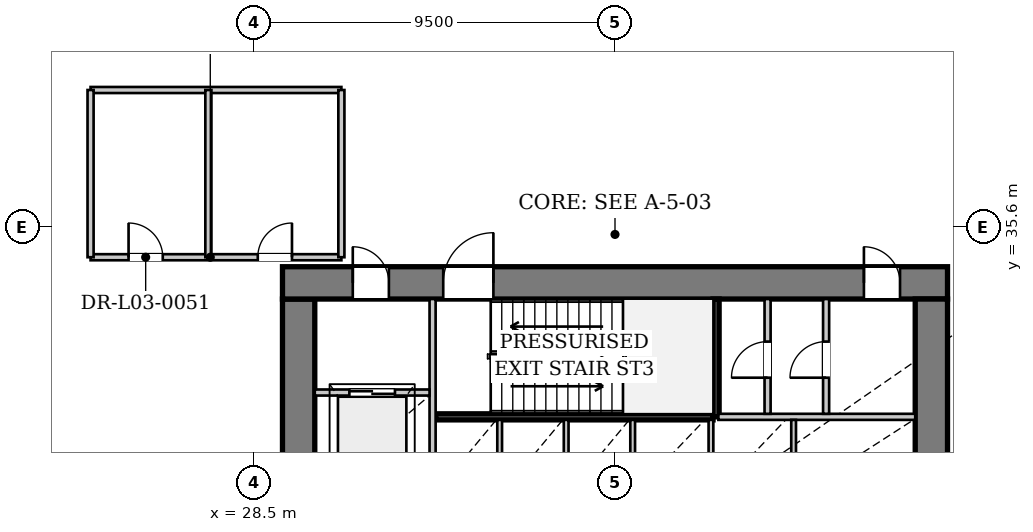
"""IFC4 building model, lengths in metres.
Left out: names, types, materials, properties, quantities, classifications, styles, units other than length and angle.
Written with IfcOpenShell. Run it as: python <this file> out.ifc"""

import sys

from ifc_helpers import new_model, si_unit, direction, frame, frame_2d, origin, place, context, subcontext, project, spatial, rectangle, extrude, source, transform, mapped, element, fill, save


model = new_model("IFC4")
c1 = context("Model", 3, precision=1e-05, world=origin(), true_north=direction((0.0, 1.0)))
c2 = subcontext(c1, "Body", "Model", "MODEL_VIEW")
j1 = project(units=[si_unit("LENGTHUNIT", "METRE"), si_unit("PLANEANGLEUNIT", "RADIAN")], contexts=[c1])
p1 = place(None, origin())
s1 = spatial("IfcSite", under=j1, at=p1, CompositionType="ELEMENT")
p2 = place(p1, origin())
s2 = spatial("IfcBuilding", under=s1, at=p2, CompositionType="ELEMENT")
p3 = place(p2, frame((0.0, 0.0, 15.6)))
s3 = spatial("IfcBuildingStorey", under=s2, at=p3, CompositionType="ELEMENT", Elevation=15.6)
p4 = place(p3, frame((29.675, 19.5, 0.0), z_axis=(0.0, 0.0, 1.0), x_axis=(0.0, 1.0, 0.0)))
e1 = element("IfcWall", 1, at=p4, inside=s3, PredefinedType="SHEAR", context=c2, shape_type="SweptSolid", body=[
    extrude(rectangle(XDim=14.2, YDim=0.85, at=frame_2d((7.1, 0.0))), origin(), (0.0, 0.0, 1.0), 4.18),
])
p5 = place(p4, frame((7.42, 0.0, 0.0)))
e2 = element("IfcOpeningElement", 2, at=p5, cuts=e1, PredefinedType="OPENING", context=c2, shape_type="SweptSolid", body=[
    extrude(rectangle(XDim=1.6, YDim=2.2, at=frame_2d((0.8, 1.1))), frame((0.0, 0.435, 0.0), z_axis=(0.0, -1.0, 0.0), x_axis=(1.0, 0.0, 0.0)), (0.0, 0.0, 1.0), 0.87),
])
p6 = place(p3, frame((29.25, 34.125, 0.0), z_axis=(0.0, 0.0, 1.0), x_axis=(1.0, 0.0, 0.0)))
e3 = element("IfcWall", 3, at=p6, inside=s3, PredefinedType="SHEAR", context=c2, shape_type="SweptSolid", body=[
    extrude(rectangle(XDim=17.5, YDim=0.85, at=frame_2d((8.75, 0.0))), origin(), (0.0, 0.0, 1.0), 4.18),
])
p7 = place(p6, frame((1.85, 0.0, 0.0)))
e4 = element("IfcOpeningElement", 4, at=p7, cuts=e3, PredefinedType="OPENING", context=c2, shape_type="SweptSolid", body=[
    extrude(rectangle(XDim=0.95, YDim=2.1, at=frame_2d((0.475, 1.05))), frame((0.0, 0.435, 0.0), z_axis=(0.0, -1.0, 0.0), x_axis=(1.0, 0.0, 0.0)), (0.0, 0.0, 1.0), 0.87),
])
p8 = place(p6, frame((4.23, 0.0, 0.0)))
e5 = element("IfcOpeningElement", 5, at=p8, cuts=e3, PredefinedType="OPENING", context=c2, shape_type="SweptSolid", body=[
    extrude(rectangle(XDim=1.32, YDim=2.2, at=frame_2d((0.66, 1.1))), frame((0.0, 0.435, 0.0), z_axis=(0.0, -1.0, 0.0), x_axis=(1.0, 0.0, 0.0)), (0.0, 0.0, 1.0), 0.87),
])
p9 = place(p6, frame((15.3, 0.0, 0.0)))
e6 = element("IfcOpeningElement", 6, at=p9, cuts=e3, PredefinedType="OPENING", context=c2, shape_type="SweptSolid", body=[
    extrude(rectangle(XDim=0.95, YDim=2.1, at=frame_2d((0.475, 1.05))), frame((0.0, 0.435, 0.0), z_axis=(0.0, -1.0, 0.0), x_axis=(1.0, 0.0, 0.0)), (0.0, 0.0, 1.0), 0.87),
])
p10 = place(p3, frame((46.325, 33.7, 0.0), z_axis=(0.0, 0.0, 1.0), x_axis=(0.0, -1.0, 0.0)))
e7 = element("IfcWall", 7, at=p10, inside=s3, PredefinedType="SHEAR", context=c2, shape_type="SweptSolid", body=[
    extrude(rectangle(XDim=14.2, YDim=0.85, at=frame_2d((7.1, 0.0))), origin(), (0.0, 0.0, 1.0), 4.18),
])
p11 = place(p10, frame((5.18, 0.0, 0.0)))
e8 = element("IfcOpeningElement", 8, at=p11, cuts=e7, PredefinedType="OPENING", context=c2, shape_type="SweptSolid", body=[
    extrude(rectangle(XDim=1.6, YDim=2.2, at=frame_2d((0.8, 1.1))), frame((0.0, 0.435, 0.0), z_axis=(0.0, -1.0, 0.0), x_axis=(1.0, 0.0, 0.0)), (0.0, 0.0, 1.0), 0.87),
])
p12 = place(p3, frame((33.28, 30.6, 0.0), z_axis=(0.0, 0.0, 1.0), x_axis=(1.0, 0.0, 0.0)))
e9 = element("IfcWall", 9, at=p12, inside=s3, PredefinedType="PARTITIONING", context=c2, shape_type="SweptSolid", body=[
    extrude(rectangle(XDim=7.3, YDim=0.16, at=frame_2d((3.65, 0.0))), origin(), (0.0, 0.0, 1.0), 4.18),
])
p13 = place(p3, frame((40.66, 30.6, 0.0), z_axis=(0.0, 0.0, 1.0), x_axis=(0.0, 1.0, 0.0)))
e10 = element("IfcWall", 10, at=p13, inside=s3, PredefinedType="PARTITIONING", context=c2, shape_type="SweptSolid", body=[
    extrude(rectangle(XDim=3.1, YDim=0.16, at=frame_2d((1.55, 0.0))), origin(), (0.0, 0.0, 1.0), 4.18),
])
p14 = place(p3, frame((33.2, 28.44, 0.0), z_axis=(0.0, 0.0, 1.0), x_axis=(0.0, 1.0, 0.0)))
e11 = element("IfcWall", 11, at=p14, inside=s3, PredefinedType="PARTITIONING", context=c2, shape_type="SweptSolid", body=[
    extrude(rectangle(XDim=5.26, YDim=0.16, at=frame_2d((2.63, 0.0))), origin(), (0.0, 0.0, 1.0), 4.18),
])
p15 = place(p3, frame((30.1, 31.24, 0.0), z_axis=(0.0, 0.0, 1.0), x_axis=(1.0, 0.0, 0.0)))
e12 = element("IfcWall", 12, at=p15, inside=s3, PredefinedType="PARTITIONING", context=c2, shape_type="SweptSolid", body=[
    extrude(rectangle(XDim=3.02, YDim=0.16, at=frame_2d((1.51, 0.0))), origin(), (0.0, 0.0, 1.0), 4.18),
])
p16 = place(p15, frame((0.91, 0.0, 0.0)))
e13 = element("IfcOpeningElement", 13, at=p16, cuts=e12, PredefinedType="OPENING", context=c2, shape_type="SweptSolid", body=[
    extrude(rectangle(XDim=1.2, YDim=2.2, at=frame_2d((0.6, 1.1))), frame((0.0, 0.09, 0.0), z_axis=(0.0, -1.0, 0.0), x_axis=(1.0, 0.0, 0.0)), (0.0, 0.0, 1.0), 0.18),
])
p17 = place(p3, frame((40.72, 30.6, 0.0), z_axis=(0.0, 0.0, 1.0), x_axis=(1.0, 0.0, 0.0)))
e14 = element("IfcWall", 14, at=p17, inside=s3, PredefinedType="PARTITIONING", context=c2, shape_type="SweptSolid", body=[
    extrude(rectangle(XDim=5.18, YDim=0.16, at=frame_2d((2.59, 0.0))), origin(), (0.0, 0.0, 1.0), 4.18),
])
for number, where, z_axis, x_axis in (
    (15, (34.965, 28.6, 0.0), (0.0, 0.0, 1.0), (0.0, 1.0, 0.0)),
    (16, (36.715, 28.6, 0.0), (0.0, 0.0, 1.0), (0.0, 1.0, 0.0)),
    (17, (38.465, 28.6, 0.0), (0.0, 0.0, 1.0), (0.0, 1.0, 0.0)),
    (18, (40.525, 28.6, 0.0), (0.0, 0.0, 1.0), (0.0, 1.0, 0.0)),
    (19, (42.7, 28.6, 0.0), (0.0, 0.0, 1.0), (0.0, 1.0, 0.0)),
):
    element("IfcWall", number, at=place(p3, frame(where, z_axis=z_axis, x_axis=x_axis)), inside=s3, PredefinedType="PARTITIONING", context=c2, shape_type="SweptSolid", body=[
        extrude(rectangle(XDim=1.92, YDim=0.125, at=frame_2d((0.96, 0.0))), origin(), (0.0, 0.0, 1.0), 4.18),
    ])
p18 = place(p3, frame((42.015, 30.68, 0.0), z_axis=(0.0, 0.0, 1.0), x_axis=(0.0, 1.0, 0.0)))
e20 = element("IfcWall", 20, at=p18, inside=s3, PredefinedType="PARTITIONING", context=c2, shape_type="SweptSolid", body=[
    extrude(rectangle(XDim=3.02, YDim=0.16, at=frame_2d((1.51, 0.0))), origin(), (0.0, 0.0, 1.0), 4.18),
])
p19 = place(p18, frame((0.95, 0.0, 0.0)))
e21 = element("IfcOpeningElement", 21, at=p19, cuts=e20, PredefinedType="OPENING", context=c2, shape_type="SweptSolid", body=[
    extrude(rectangle(XDim=0.95, YDim=2.1, at=frame_2d((0.475, 1.05))), frame((0.0, 0.09, 0.0), z_axis=(0.0, -1.0, 0.0), x_axis=(1.0, 0.0, 0.0)), (0.0, 0.0, 1.0), 0.18),
])
p20 = place(p3, frame((43.555, 30.68, 0.0), z_axis=(0.0, 0.0, 1.0), x_axis=(0.0, 1.0, 0.0)))
e22 = element("IfcWall", 22, at=p20, inside=s3, PredefinedType="PARTITIONING", context=c2, shape_type="SweptSolid", body=[
    extrude(rectangle(XDim=3.02, YDim=0.16, at=frame_2d((1.51, 0.0))), origin(), (0.0, 0.0, 1.0), 4.18),
])
p21 = place(p20, frame((0.95, 0.0, 0.0)))
e23 = element("IfcOpeningElement", 23, at=p21, cuts=e22, PredefinedType="OPENING", context=c2, shape_type="SweptSolid", body=[
    extrude(rectangle(XDim=0.95, YDim=2.1, at=frame_2d((0.475, 1.05))), frame((0.0, 0.09, 0.0), z_axis=(0.0, -1.0, 0.0), x_axis=(1.0, 0.0, 0.0)), (0.0, 0.0, 1.0), 0.18),
])
p22 = place(p3, frame((24.2, 34.8, 0.0), z_axis=(0.0, 0.0, 1.0), x_axis=(1.0, 0.0, 0.0)))
e24 = element("IfcWall", 24, at=p22, inside=s3, PredefinedType="PARTITIONING", context=c2, shape_type="SweptSolid", body=[
    extrude(rectangle(XDim=6.6, YDim=0.16, at=frame_2d((3.3, 0.0))), origin(), (0.0, 0.0, 1.0), 3.53),
])
p23 = place(p22, frame((1.0, 0.0, 0.0)))
e25 = element("IfcOpeningElement", 25, at=p23, cuts=e24, PredefinedType="OPENING", context=c2, shape_type="SweptSolid", body=[
    extrude(rectangle(XDim=0.9, YDim=2.1, at=frame_2d((0.45, 1.05))), frame((0.0, 0.09, 0.0), z_axis=(0.0, -1.0, 0.0), x_axis=(1.0, 0.0, 0.0)), (0.0, 0.0, 1.0), 0.18),
])
p24 = place(p22, frame((4.4, 0.0, 0.0)))
e26 = element("IfcOpeningElement", 26, at=p24, cuts=e24, PredefinedType="OPENING", context=c2, shape_type="SweptSolid", body=[
    extrude(rectangle(XDim=0.9, YDim=2.1, at=frame_2d((0.45, 1.05))), frame((0.0, 0.09, 0.0), z_axis=(0.0, -1.0, 0.0), x_axis=(1.0, 0.0, 0.0)), (0.0, 0.0, 1.0), 0.18),
])
p25 = place(p3, frame((24.2, 39.2, 0.0), z_axis=(0.0, 0.0, 1.0), x_axis=(1.0, 0.0, 0.0)))
e27 = element("IfcWall", 27, at=p25, inside=s3, PredefinedType="PARTITIONING", context=c2, shape_type="SweptSolid", body=[
    extrude(rectangle(XDim=6.6, YDim=0.16, at=frame_2d((3.3, 0.0))), origin(), (0.0, 0.0, 1.0), 3.53),
])
for number, where, z_axis, x_axis in (
    (28, (24.2, 34.8, 0.0), (0.0, 0.0, 1.0), (0.0, 1.0, 0.0)),
    (29, (27.3, 34.8, 0.0), (0.0, 0.0, 1.0), (0.0, 1.0, 0.0)),
    (30, (30.8, 34.8, 0.0), (0.0, 0.0, 1.0), (0.0, 1.0, 0.0)),
):
    element("IfcWall", number, at=place(p3, frame(where, z_axis=z_axis, x_axis=x_axis)), inside=s3, PredefinedType="PARTITIONING", context=c2, shape_type="SweptSolid", body=[
        extrude(rectangle(XDim=4.4, YDim=0.16, at=frame_2d((2.2, 0.0))), origin(), (0.0, 0.0, 1.0), 3.53),
    ])
m1 = source(origin(), c2, "Body", "SweptSolid", [
    extrude(rectangle(XDim=0.95, YDim=2.1, at=frame_2d((0.475, 1.05))), frame((0.0, 0.025, 0.0), z_axis=(0.0, -1.0, 0.0), x_axis=(1.0, 0.0, 0.0)), (0.0, 0.0, 1.0), 0.05),
])
p26 = place(p7, origin())
e31 = element("IfcDoor", 31, at=p26, inside=s3, OperationType="SINGLE_SWING_LEFT", PredefinedType="DOOR", context=c2, shape_type="MappedRepresentation", body=[
    mapped(m1, transform((0.0, 0.0, 0.0), x_axis=(1.0, 0.0, 0.0), y_axis=(0.0, 1.0, 0.0), z_axis=(0.0, 0.0, 1.0), scale=1.0)),
])
fill(e4, e31)
m2 = source(origin(), c2, "Body", "SweptSolid", [
    extrude(rectangle(XDim=1.32, YDim=2.2, at=frame_2d((0.66, 1.1))), frame((0.0, 0.025, 0.0), z_axis=(0.0, -1.0, 0.0), x_axis=(1.0, 0.0, 0.0)), (0.0, 0.0, 1.0), 0.05),
])
p27 = place(p8, origin())
e32 = element("IfcDoor", 32, at=p27, inside=s3, OperationType="SINGLE_SWING_RIGHT", PredefinedType="DOOR", context=c2, shape_type="MappedRepresentation", body=[
    mapped(m2, transform((0.0, 0.0, 0.0), x_axis=(1.0, 0.0, 0.0), y_axis=(0.0, 1.0, 0.0), z_axis=(0.0, 0.0, 1.0), scale=1.0)),
])
fill(e5, e32)
m3 = source(origin(), c2, "Body", "SweptSolid", [
    extrude(rectangle(XDim=1.2, YDim=2.2, at=frame_2d((0.6, 1.1))), frame((0.0, 0.025, 0.0), z_axis=(0.0, -1.0, 0.0), x_axis=(1.0, 0.0, 0.0)), (0.0, 0.0, 1.0), 0.05),
])
p28 = place(p16, origin())
e33 = element("IfcDoor", 33, at=p28, inside=s3, OperationType="DOUBLE_DOOR_SLIDING", PredefinedType="DOOR", context=c2, shape_type="MappedRepresentation", body=[
    mapped(m3, transform((0.0, 0.0, 0.0), x_axis=(1.0, 0.0, 0.0), y_axis=(0.0, 1.0, 0.0), z_axis=(0.0, 0.0, 1.0), scale=1.0)),
])
fill(e13, e33)
p29 = place(p19, origin())
e34 = element("IfcDoor", 34, at=p29, inside=s3, OperationType="SINGLE_SWING_LEFT", PredefinedType="DOOR", context=c2, shape_type="MappedRepresentation", body=[
    mapped(m1, transform((0.0, 0.0, 0.0), x_axis=(1.0, 0.0, 0.0), y_axis=(0.0, 1.0, 0.0), z_axis=(0.0, 0.0, 1.0), scale=1.0)),
])
fill(e21, e34)
p30 = place(p21, origin())
e35 = element("IfcDoor", 35, at=p30, inside=s3, OperationType="SINGLE_SWING_LEFT", PredefinedType="DOOR", context=c2, shape_type="MappedRepresentation", body=[
    mapped(m1, transform((0.0, 0.0, 0.0), x_axis=(1.0, 0.0, 0.0), y_axis=(0.0, 1.0, 0.0), z_axis=(0.0, 0.0, 1.0), scale=1.0)),
])
fill(e23, e35)
p31 = place(p9, origin())
e36 = element("IfcDoor", 36, at=p31, inside=s3, OperationType="SINGLE_SWING_LEFT", PredefinedType="DOOR", context=c2, shape_type="MappedRepresentation", body=[
    mapped(m1, transform((0.0, 0.0, 0.0), x_axis=(1.0, 0.0, 0.0), y_axis=(0.0, 1.0, 0.0), z_axis=(0.0, 0.0, 1.0), scale=1.0)),
])
fill(e6, e36)
m4 = source(origin(), c2, "Body", "SweptSolid", [
    extrude(rectangle(XDim=0.9, YDim=2.1, at=frame_2d((0.45, 1.05))), frame((0.0, 0.025, 0.0), z_axis=(0.0, -1.0, 0.0), x_axis=(1.0, 0.0, 0.0)), (0.0, 0.0, 1.0), 0.05),
])
p32 = place(p23, origin())
e37 = element("IfcDoor", 37, at=p32, inside=s3, OperationType="SINGLE_SWING_LEFT", PredefinedType="DOOR", context=c2, shape_type="MappedRepresentation", body=[
    mapped(m4, transform((0.0, 0.0, 0.0), x_axis=(1.0, 0.0, 0.0), y_axis=(0.0, 1.0, 0.0), z_axis=(0.0, 0.0, 1.0), scale=1.0)),
])
fill(e25, e37)
p33 = place(p24, origin())
e38 = element("IfcDoor", 38, at=p33, inside=s3, OperationType="SINGLE_SWING_RIGHT", PredefinedType="DOOR", context=c2, shape_type="MappedRepresentation", body=[
    mapped(m4, transform((0.0, 0.0, 0.0), x_axis=(1.0, 0.0, 0.0), y_axis=(0.0, 1.0, 0.0), z_axis=(0.0, 0.0, 1.0), scale=1.0)),
])
fill(e26, e38)
save(model, sys.argv[1])
